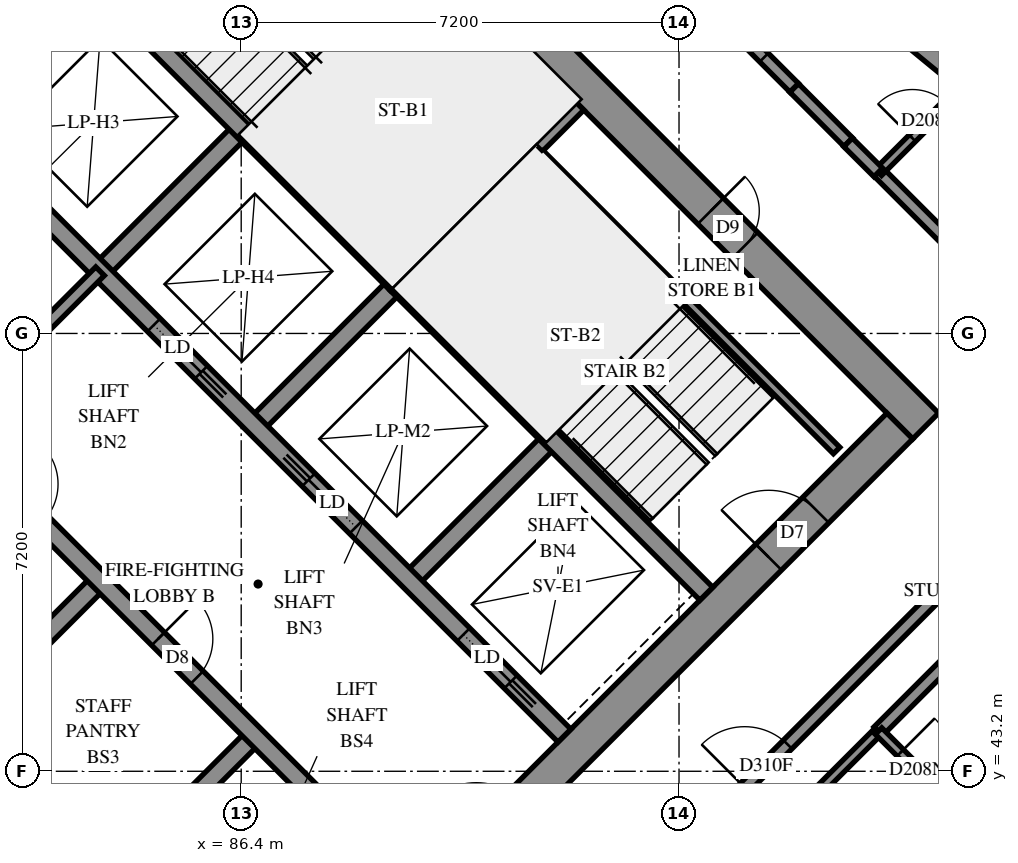
"""IFC4 building model, lengths in metres.
Left out: names, types, materials, properties, quantities, classifications, styles, units other than length and angle.
Written with IfcOpenShell. Run it as: python <this file> out.ifc"""

import sys

from ifc_helpers import new_model, si_unit, direction, frame, frame_2d, origin, place, context, subcontext, project, spatial, polyline, rectangle, outline, extrude, element, fill, save


model = new_model("IFC4")
c1 = context("Model", 3, precision=1e-05, world=origin(), true_north=direction((0.0, 1.0)))
c2 = subcontext(c1, "Body", "Model", "MODEL_VIEW")
j1 = project(units=[si_unit("LENGTHUNIT", "METRE"), si_unit("PLANEANGLEUNIT", "RADIAN")], contexts=[c1])
p1 = place(None, origin())
s1 = spatial("IfcSite", under=j1, at=p1, CompositionType="ELEMENT")
p2 = place(p1, origin())
s2 = spatial("IfcBuilding", under=s1, at=p2, CompositionType="ELEMENT")
p3 = place(p2, frame((0.0, 0.0, 138.8)))
s3 = spatial("IfcBuildingStorey", under=s2, at=p3, CompositionType="ELEMENT", Elevation=138.8)
p4 = place(p3, frame((76.018, 49.302, -0.3), z_axis=(0.0, 0.0, 1.0), x_axis=(0.7071067812, -0.7071067812, 0.0)))
e1 = element("IfcWall", 1, at=p4, inside=s3, PredefinedType="SHEAR", context=c2, shape_type="SweptSolid", body=[
    extrude(rectangle(XDim=15.6, YDim=0.6, at=frame_2d((7.8, 0.0))), origin(), (0.0, 0.0, 1.0), 2.7),
])
p5 = place(p3, frame((86.625, 59.908, -0.3), z_axis=(0.0, 0.0, 1.0), x_axis=(0.7071067812, -0.7071067812, 0.0)))
e2 = element("IfcWall", 2, at=p5, inside=s3, PredefinedType="SHEAR", context=c2, shape_type="SweptSolid", body=[
    extrude(rectangle(XDim=15.6, YDim=0.6, at=frame_2d((7.8, 0.0))), origin(), (0.0, 0.0, 1.0), 2.7),
])
p6 = place(p5, frame((10.6, 0.0, 0.3)))
e3 = element("IfcOpeningElement", 3, at=p6, cuts=e2, PredefinedType="OPENING", context=c2, shape_type="SweptSolid", body=[
    extrude(rectangle(XDim=0.8, YDim=2.1, at=frame_2d((0.4, 1.05))), frame((0.0, 0.31, 0.0), z_axis=(0.0, -1.0, 0.0), x_axis=(1.0, 0.0, 0.0)), (0.0, 0.0, 1.0), 0.62),
])
p7 = place(p3, frame((76.442, 49.302, -0.3), z_axis=(0.0, 0.0, 1.0), x_axis=(0.7071067812, 0.7071067812, 0.0)))
e4 = element("IfcWall", 4, at=p7, inside=s3, PredefinedType="SHEAR", context=c2, shape_type="SweptSolid", body=[
    extrude(rectangle(XDim=14.4, YDim=0.6, at=frame_2d((7.2, 0.0))), origin(), (0.0, 0.0, 1.0), 2.7),
])
p8 = place(p7, frame((4.55, 0.0, 0.3)))
e5 = element("IfcOpeningElement", 5, at=p8, cuts=e4, PredefinedType="OPENING", context=c2, shape_type="SweptSolid", body=[
    extrude(rectangle(XDim=1.1, YDim=2.1, at=frame_2d((0.55, 1.05))), frame((0.0, 0.31, 0.0), z_axis=(0.0, -1.0, 0.0), x_axis=(1.0, 0.0, 0.0)), (0.0, 0.0, 1.0), 0.62),
])
p9 = place(p7, frame((11.35, 0.0, 0.3)))
e6 = element("IfcOpeningElement", 6, at=p9, cuts=e4, PredefinedType="OPENING", context=c2, shape_type="SweptSolid", body=[
    extrude(rectangle(XDim=1.1, YDim=2.1, at=frame_2d((0.55, 1.05))), frame((0.0, 0.31, 0.0), z_axis=(0.0, -1.0, 0.0), x_axis=(1.0, 0.0, 0.0)), (0.0, 0.0, 1.0), 0.62),
])
p10 = place(p3, frame((87.049, 38.695, -0.3), z_axis=(0.0, 0.0, 1.0), x_axis=(0.7071067812, 0.7071067812, 0.0)))
e7 = element("IfcWall", 7, at=p10, inside=s3, PredefinedType="SHEAR", context=c2, shape_type="SweptSolid", body=[
    extrude(rectangle(XDim=14.4, YDim=0.6, at=frame_2d((7.2, 0.0))), origin(), (0.0, 0.0, 1.0), 2.7),
])
p11 = place(p10, frame((4.55, 0.0, 0.3)))
e8 = element("IfcOpeningElement", 8, at=p11, cuts=e7, PredefinedType="OPENING", context=c2, shape_type="SweptSolid", body=[
    extrude(rectangle(XDim=1.1, YDim=2.1, at=frame_2d((0.55, 1.05))), frame((0.0, 0.31, 0.0), z_axis=(0.0, -1.0, 0.0), x_axis=(1.0, 0.0, 0.0)), (0.0, 0.0, 1.0), 0.62),
])
p12 = place(p10, frame((11.35, 0.0, 0.3)))
e9 = element("IfcOpeningElement", 9, at=p12, cuts=e7, PredefinedType="OPENING", context=c2, shape_type="SweptSolid", body=[
    extrude(rectangle(XDim=1.1, YDim=2.1, at=frame_2d((0.55, 1.05))), frame((0.0, 0.31, 0.0), z_axis=(0.0, -1.0, 0.0), x_axis=(1.0, 0.0, 0.0)), (0.0, 0.0, 1.0), 0.62),
])
p13 = place(p3, frame((84.079, 51.423, 0.0), z_axis=(0.0, 0.0, 1.0), x_axis=(0.7071219326, 0.7070916295, 0.0)))
e10 = element("IfcWall", 10, at=p13, inside=s3, PredefinedType="SOLIDWALL", context=c2, shape_type="SweptSolid", body=[
    extrude(rectangle(XDim=3.3, YDim=0.3, at=frame_2d((1.65, 0.0))), origin(), (0.0, 0.0, 1.0), 3.1),
])
p14 = place(p3, frame((81.746, 43.999, 0.0), z_axis=(0.0, 0.0, 1.0), x_axis=(0.7071067812, 0.7071067812, 0.0)))
e11 = element("IfcWall", 11, at=p14, inside=s3, PredefinedType="SOLIDWALL", context=c2, shape_type="SweptSolid", body=[
    extrude(rectangle(XDim=3.3, YDim=0.3, at=frame_2d((1.65, 0.0))), origin(), (0.0, 0.0, 1.0), 3.1),
])
p15 = place(p3, frame((86.625, 48.878, 0.0), z_axis=(0.0, 0.0, 1.0), x_axis=(0.7071067812, 0.7071067812, 0.0)))
e12 = element("IfcWall", 12, at=p15, inside=s3, PredefinedType="SOLIDWALL", context=c2, shape_type="SweptSolid", body=[
    extrude(rectangle(XDim=3.3, YDim=0.3, at=frame_2d((1.65, 0.0))), origin(), (0.0, 0.0, 1.0), 3.1),
])
p16 = place(p3, frame((84.291, 41.453, 0.0), z_axis=(0.0, 0.0, 1.0), x_axis=(0.7071067812, 0.7071067812, 0.0)))
e13 = element("IfcWall", 13, at=p16, inside=s3, PredefinedType="SOLIDWALL", context=c2, shape_type="SweptSolid", body=[
    extrude(rectangle(XDim=3.3, YDim=0.3, at=frame_2d((1.65, 0.0))), origin(), (0.0, 0.0, 1.0), 3.1),
])
p17 = place(p3, frame((89.17, 46.332, 0.0), z_axis=(0.0, 0.0, 1.0), x_axis=(0.7071067812, 0.7071067812, 0.0)))
e14 = element("IfcWall", 14, at=p17, inside=s3, PredefinedType="SOLIDWALL", context=c2, shape_type="SweptSolid", body=[
    extrude(rectangle(XDim=3.3, YDim=0.3, at=frame_2d((1.65, 0.0))), origin(), (0.0, 0.0, 1.0), 3.1),
])
p18 = place(p3, frame((78.988, 51.423, 0.0), z_axis=(0.0, 0.0, 1.0), x_axis=(0.7071067812, -0.7071067812, 0.0)))
e15 = element("IfcWall", 15, at=p18, inside=s3, PredefinedType="SOLIDWALL", context=c2, shape_type="SweptSolid", body=[
    extrude(rectangle(XDim=14.4, YDim=0.3, at=frame_2d((7.2, 0.0))), origin(), (0.0, 0.0, 1.0), 3.1),
])
p19 = place(p18, frame((1.35, 0.0, 0.0)))
e16 = element("IfcOpeningElement", 16, at=p19, cuts=e15, PredefinedType="OPENING", context=c2, shape_type="SweptSolid", body=[
    extrude(rectangle(XDim=0.9, YDim=2.1, at=frame_2d((0.45, 1.05))), frame((0.0, 0.16, 0.0), z_axis=(0.0, -1.0, 0.0), x_axis=(1.0, 0.0, 0.0)), (0.0, 0.0, 1.0), 0.32),
])
p20 = place(p18, frame((4.95, 0.0, 0.0)))
e17 = element("IfcOpeningElement", 17, at=p20, cuts=e15, PredefinedType="OPENING", context=c2, shape_type="SweptSolid", body=[
    extrude(rectangle(XDim=0.9, YDim=2.1, at=frame_2d((0.45, 1.05))), frame((0.0, 0.16, 0.0), z_axis=(0.0, -1.0, 0.0), x_axis=(1.0, 0.0, 0.0)), (0.0, 0.0, 1.0), 0.32),
])
p21 = place(p18, frame((8.55, 0.0, 0.0)))
e18 = element("IfcOpeningElement", 18, at=p21, cuts=e15, PredefinedType="OPENING", context=c2, shape_type="SweptSolid", body=[
    extrude(rectangle(XDim=0.9, YDim=2.1, at=frame_2d((0.45, 1.05))), frame((0.0, 0.16, 0.0), z_axis=(0.0, -1.0, 0.0), x_axis=(1.0, 0.0, 0.0)), (0.0, 0.0, 1.0), 0.32),
])
p22 = place(p18, frame((12.05, 0.0, 0.0)))
e19 = element("IfcOpeningElement", 19, at=p22, cuts=e15, PredefinedType="OPENING", context=c2, shape_type="SweptSolid", body=[
    extrude(rectangle(XDim=1.1, YDim=2.1, at=frame_2d((0.55, 1.05))), frame((0.0, 0.16, 0.0), z_axis=(0.0, -1.0, 0.0), x_axis=(1.0, 0.0, 0.0)), (0.0, 0.0, 1.0), 0.32),
])
p23 = place(p3, frame((81.534, 53.969, 0.0), z_axis=(0.0, 0.0, 1.0), x_axis=(0.707103309, -0.7071102534, 0.0)))
e20 = element("IfcWall", 20, at=p23, inside=s3, PredefinedType="SOLIDWALL", context=c2, shape_type="SweptSolid", body=[
    extrude(rectangle(XDim=14.4, YDim=0.3, at=frame_2d((7.2, 0.0))), origin(), (0.0, 0.0, 1.0), 3.1),
])
p24 = place(p23, frame((1.25, 0.0, 0.0)))
e21 = element("IfcOpeningElement", 21, at=p24, cuts=e20, PredefinedType="OPENING", context=c2, shape_type="SweptSolid", body=[
    extrude(rectangle(XDim=1.1, YDim=2.1, at=frame_2d((0.55, 1.05))), frame((0.0, 0.16, 0.0), z_axis=(0.0, -1.0, 0.0), x_axis=(1.0, 0.0, 0.0)), (0.0, 0.0, 1.0), 0.32),
])
p25 = place(p23, frame((4.85, 0.0, 0.0)))
e22 = element("IfcOpeningElement", 22, at=p25, cuts=e20, PredefinedType="OPENING", context=c2, shape_type="SweptSolid", body=[
    extrude(rectangle(XDim=1.1, YDim=2.1, at=frame_2d((0.55, 1.05))), frame((0.0, 0.16, 0.0), z_axis=(0.0, -1.0, 0.0), x_axis=(1.0, 0.0, 0.0)), (0.0, 0.0, 1.0), 0.32),
])
p26 = place(p23, frame((8.45, 0.0, 0.0)))
e23 = element("IfcOpeningElement", 23, at=p26, cuts=e20, PredefinedType="OPENING", context=c2, shape_type="SweptSolid", body=[
    extrude(rectangle(XDim=1.1, YDim=2.1, at=frame_2d((0.55, 1.05))), frame((0.0, 0.16, 0.0), z_axis=(0.0, -1.0, 0.0), x_axis=(1.0, 0.0, 0.0)), (0.0, 0.0, 1.0), 0.32),
])
p27 = place(p23, frame((12.05, 0.0, 0.0)))
e24 = element("IfcOpeningElement", 24, at=p27, cuts=e20, PredefinedType="OPENING", context=c2, shape_type="SweptSolid", body=[
    extrude(rectangle(XDim=1.1, YDim=2.1, at=frame_2d((0.55, 1.05))), frame((0.0, 0.16, 0.0), z_axis=(0.0, -1.0, 0.0), x_axis=(1.0, 0.0, 0.0)), (0.0, 0.0, 1.0), 0.32),
])
for number, where, z_axis, x_axis in (
    (25, (83.867, 56.302, 0.0), (0.0, 0.0, 1.0), (0.707, -0.707, 0.0)),
    (26, (88.958, 51.211, 0.0), (0.0, 0.0, 1.0), (0.707, -0.707, 0.0)),
):
    element("IfcWall", number, at=place(p3, frame(where, z_axis=z_axis, x_axis=x_axis)), inside=s3, PredefinedType="SOLIDWALL", context=c2, shape_type="SweptSolid", body=[
        extrude(rectangle(XDim=7.2, YDim=0.3, at=frame_2d((3.6, 0.0))), origin(), (0.0, 0.0, 1.0), 3.1),
    ])
p28 = place(p3, frame((88.958, 51.211, 0.0), z_axis=(0.0, 0.0, 1.0), x_axis=(0.7071067812, 0.7071067812, 0.0)))
e27 = element("IfcWall", 27, at=p28, inside=s3, PredefinedType="SOLIDWALL", context=c2, shape_type="SweptSolid", body=[
    extrude(rectangle(XDim=4.2, YDim=0.3, at=frame_2d((2.1, 0.0))), origin(), (0.0, 0.0, 1.0), 3.1),
])
p29 = place(p3, frame((98.564, 54.445, 0.0), z_axis=(0.0, 0.0, 1.0), x_axis=(-0.7725898055, 0.6349054988, 0.0)))
e28 = element("IfcWall", 28, at=p29, inside=s3, PredefinedType="SOLIDWALL", context=c2, shape_type="SweptSolid", body=[
    extrude(outline(polyline([(-0.025, -0.25), (3.365, -0.25), (3.414, 0.25), (0.025, 0.25), (-0.025, -0.25)])), origin(), (0.0, 0.0, 1.0), 3.1),
])
p30 = place(p29, frame((1.45, 0.0, 0.45)))
e29 = element("IfcOpeningElement", 29, at=p30, cuts=e28, PredefinedType="OPENING", context=c2, shape_type="SweptSolid", body=[
    extrude(rectangle(XDim=1.2, YDim=2.5, at=frame_2d((0.6, 1.25))), frame((0.0, 0.26, 0.0), z_axis=(0.0, -1.0, 0.0), x_axis=(1.0, 0.0, 0.0)), (0.0, 0.0, 1.0), 0.52),
])
p31 = place(p3, frame((91.313, 53.354, 0.0), z_axis=(0.0, 0.0, 1.0), x_axis=(0.7071140275, -0.7070995348, 0.0)))
e30 = element("IfcWall", 30, at=p31, inside=s3, PredefinedType="PARTITIONING", context=c2, shape_type="SweptSolid", body=[
    extrude(rectangle(XDim=6.9, YDim=0.15, at=frame_2d((3.45, 0.0))), origin(), (0.0, 0.0, 1.0), 3.1),
])
p32 = place(p3, frame((81.534, 48.878, 0.0), z_axis=(0.0, 0.0, 1.0), x_axis=(0.707092892, 0.7071206701, 0.0)))
e31 = element("IfcWall", 31, at=p32, inside=s3, PredefinedType="PARTITIONING", context=c2, shape_type="SweptSolid", body=[
    extrude(rectangle(XDim=3.6, YDim=0.2, at=frame_2d((1.8, 0.0))), origin(), (0.0, 0.0, 1.0), 3.1),
])
p33 = place(p3, frame((88.326, 61.609, 0.0), z_axis=(0.0, 0.0, 1.0), x_axis=(0.7071067812, -0.7071067812, 0.0)))
e32 = element("IfcWall", 32, at=p33, inside=s3, PredefinedType="PARTITIONING", context=c2, shape_type="SweptSolid", body=[
    extrude(rectangle(XDim=10.14, YDim=0.2, at=frame_2d((5.07, 0.0))), origin(), (0.0, 0.0, 1.0), 3.1),
])
p34 = place(p33, frame((8.535, 0.0, 0.0)))
e33 = element("IfcOpeningElement", 33, at=p34, cuts=e32, PredefinedType="OPENING", context=c2, shape_type="SweptSolid", body=[
    extrude(rectangle(XDim=0.9, YDim=2.1, at=frame_2d((0.45, 1.05))), frame((0.0, 0.11, 0.0), z_axis=(0.0, -1.0, 0.0), x_axis=(1.0, 0.0, 0.0)), (0.0, 0.0, 1.0), 0.22),
])
p35 = place(p3, frame((94.543, 42.797, 0.0), z_axis=(0.0, 0.0, 1.0), x_axis=(0.7071067812, 0.7071067812, 0.0)))
e34 = element("IfcWall", 34, at=p35, inside=s3, PredefinedType="PARTITIONING", context=c2, shape_type="SweptSolid", body=[
    extrude(rectangle(XDim=8.901, YDim=0.2, at=frame_2d((4.45, 0.0))), origin(), (0.0, 0.0, 1.0), 3.1),
])
p36 = place(p35, frame((0.193, 0.0, 0.0)))
e35 = element("IfcOpeningElement", 35, at=p36, cuts=e34, PredefinedType="OPENING", context=c2, shape_type="SweptSolid", body=[
    extrude(rectangle(XDim=1.0, YDim=2.1, at=frame_2d((0.5, 1.05))), frame((0.0, 0.11, 0.0), z_axis=(0.0, -1.0, 0.0), x_axis=(1.0, 0.0, 0.0)), (0.0, 0.0, 1.0), 0.22),
])
p37 = place(p3, frame((96.877, 43.859, 0.0), z_axis=(0.0, 0.0, 1.0), x_axis=(0.707112746, 0.7071008163, 0.0)))
e36 = element("IfcWall", 36, at=p37, inside=s3, PredefinedType="PARTITIONING", context=c2, shape_type="SweptSolid", body=[
    extrude(rectangle(XDim=8.382, YDim=0.2, at=frame_2d((4.191, 0.0))), origin(), (0.0, 0.0, 1.0), 3.1),
])
p38 = place(p3, frame((95.179, 42.161, 0.0), z_axis=(0.0, 0.0, 1.0), x_axis=(0.7071067812, 0.7071067812, 0.0)))
e37 = element("IfcWall", 37, at=p38, inside=s3, PredefinedType="PARTITIONING", context=c2, shape_type="SweptSolid", body=[
    extrude(rectangle(XDim=2.401, YDim=0.15, at=frame_2d((1.201, 0.0))), origin(), (0.0, 0.0, 1.0), 3.1),
])
p39 = place(p3, frame((96.882, 53.053, 0.0), z_axis=(0.0, 0.0, 1.0), x_axis=(0.7071067812, -0.7071067812, 0.0)))
e38 = element("IfcWall", 38, at=p39, inside=s3, PredefinedType="PARTITIONING", context=c2, shape_type="SweptSolid", body=[
    extrude(rectangle(XDim=1.901, YDim=0.2, at=frame_2d((0.95, 0.0))), origin(), (0.0, 0.0, 1.0), 3.1),
])
p40 = place(p3, frame((96.881, 43.861, 0.0), z_axis=(0.0, 0.0, 1.0), x_axis=(0.7071067812, -0.7071067812, 0.0)))
e39 = element("IfcWall", 39, at=p40, inside=s3, PredefinedType="PARTITIONING", context=c2, shape_type="SweptSolid", body=[
    extrude(rectangle(XDim=1.901, YDim=0.15, at=frame_2d((0.95, 0.0))), origin(), (0.0, 0.0, 1.0), 3.1),
])
p41 = place(p40, frame((0.505, 0.0, 0.0)))
e40 = element("IfcOpeningElement", 40, at=p41, cuts=e39, PredefinedType="OPENING", context=c2, shape_type="SweptSolid", body=[
    extrude(rectangle(XDim=0.8, YDim=2.1, at=frame_2d((0.4, 1.05))), frame((0.0, 0.085, 0.0), z_axis=(0.0, -1.0, 0.0), x_axis=(1.0, 0.0, 0.0)), (0.0, 0.0, 1.0), 0.17),
])
p42 = place(p3, frame((96.877, 53.051, 0.0), z_axis=(0.0, 0.0, 1.0), x_axis=(0.7071330019, 0.7070805595, 0.0)))
e41 = element("IfcWall", 41, at=p42, inside=s3, PredefinedType="PARTITIONING", context=c2, shape_type="SweptSolid", body=[
    extrude(rectangle(XDim=1.907, YDim=0.15, at=frame_2d((0.954, 0.0))), origin(), (0.0, 0.0, 1.0), 3.1),
])
p43 = place(p42, frame((0.793, 0.0, 0.0)))
e42 = element("IfcOpeningElement", 42, at=p43, cuts=e41, PredefinedType="OPENING", context=c2, shape_type="SweptSolid", body=[
    extrude(rectangle(XDim=0.8, YDim=2.1, at=frame_2d((0.4, 1.05))), frame((0.0, 0.085, 0.0), z_axis=(0.0, -1.0, 0.0), x_axis=(1.0, 0.0, 0.0)), (0.0, 0.0, 1.0), 0.17),
])
p44 = place(p3, frame((95.494, 54.438, 0.0), z_axis=(0.0, 0.0, 1.0), x_axis=(0.706312726, -0.7078999456, 0.0)))
e43 = element("IfcWall", 43, at=p44, inside=s3, PredefinedType="PARTITIONING", context=c2, shape_type="SweptSolid", body=[
    extrude(rectangle(XDim=1.26, YDim=0.2, at=frame_2d((0.63, 0.0))), origin(), (0.0, 0.0, 1.0), 3.1),
])
p45 = place(p3, frame((96.38, 53.542, 0.0), z_axis=(0.0, 0.0, 1.0), x_axis=(0.7085338339, -0.7056768426, 0.0)))
e44 = element("IfcWall", 44, at=p45, inside=s3, PredefinedType="PARTITIONING", context=c2, shape_type="SweptSolid", body=[
    extrude(rectangle(XDim=0.7, YDim=0.2, at=frame_2d((0.35, 0.0))), origin(), (0.0, 0.0, 1.0), 3.1),
])
p46 = place(p6, origin())
e45 = element("IfcDoor", 45, at=p46, inside=s3, OperationType="SINGLE_SWING_RIGHT", PredefinedType="DOOR", context=c2, shape_type="SweptSolid", body=[
    extrude(rectangle(XDim=0.8, YDim=2.1, at=frame_2d((0.4, 1.05))), frame((0.0, 0.025, 0.0), z_axis=(0.0, -1.0, 0.0), x_axis=(1.0, 0.0, 0.0)), (0.0, 0.0, 1.0), 0.05),
])
fill(e3, e45)
p47 = place(p12, origin())
e46 = element("IfcDoor", 46, at=p47, inside=s3, OperationType="SINGLE_SWING_RIGHT", PredefinedType="DOOR", context=c2, shape_type="SweptSolid", body=[
    extrude(rectangle(XDim=1.1, YDim=2.1, at=frame_2d((0.55, 1.05))), frame((0.0, 0.025, 0.0), z_axis=(0.0, -1.0, 0.0), x_axis=(1.0, 0.0, 0.0)), (0.0, 0.0, 1.0), 0.05),
])
fill(e9, e46)
p48 = place(p21, origin())
e47 = element("IfcDoor", 47, at=p48, inside=s3, OperationType="SINGLE_SWING_LEFT", PredefinedType="DOOR", context=c2, shape_type="SweptSolid", body=[
    extrude(rectangle(XDim=0.9, YDim=2.1, at=frame_2d((0.45, 1.05))), frame((0.0, 0.025, 0.0), z_axis=(0.0, -1.0, 0.0), x_axis=(1.0, 0.0, 0.0)), (0.0, 0.0, 1.0), 0.05),
])
fill(e18, e47)
p49 = place(p25, origin())
e48 = element("IfcDoor", 48, at=p49, inside=s3, OperationType="SLIDING_TO_RIGHT", PredefinedType="DOOR", context=c2, shape_type="SweptSolid", body=[
    extrude(rectangle(XDim=1.1, YDim=2.1, at=frame_2d((0.55, 1.05))), frame((0.0, 0.025, 0.0), z_axis=(0.0, -1.0, 0.0), x_axis=(1.0, 0.0, 0.0)), (0.0, 0.0, 1.0), 0.05),
])
fill(e22, e48)
p50 = place(p26, origin())
e49 = element("IfcDoor", 49, at=p50, inside=s3, OperationType="SLIDING_TO_LEFT", PredefinedType="DOOR", context=c2, shape_type="SweptSolid", body=[
    extrude(rectangle(XDim=1.1, YDim=2.1, at=frame_2d((0.55, 1.05))), frame((0.0, 0.025, 0.0), z_axis=(0.0, -1.0, 0.0), x_axis=(1.0, 0.0, 0.0)), (0.0, 0.0, 1.0), 0.05),
])
fill(e23, e49)
p51 = place(p27, origin())
e50 = element("IfcDoor", 50, at=p51, inside=s3, OperationType="SLIDING_TO_RIGHT", PredefinedType="DOOR", context=c2, shape_type="SweptSolid", body=[
    extrude(rectangle(XDim=1.1, YDim=2.1, at=frame_2d((0.55, 1.05))), frame((0.0, 0.025, 0.0), z_axis=(0.0, -1.0, 0.0), x_axis=(1.0, 0.0, 0.0)), (0.0, 0.0, 1.0), 0.05),
])
fill(e24, e50)
p52 = place(p34, origin())
e51 = element("IfcDoor", 51, at=p52, inside=s3, OperationType="SINGLE_SWING_LEFT", PredefinedType="DOOR", context=c2, shape_type="SweptSolid", body=[
    extrude(rectangle(XDim=0.9, YDim=2.1, at=frame_2d((0.45, 1.05))), frame((0.0, 0.025, 0.0), z_axis=(0.0, -1.0, 0.0), x_axis=(1.0, 0.0, 0.0)), (0.0, 0.0, 1.0), 0.05),
])
fill(e33, e51)
p53 = place(p43, origin())
e52 = element("IfcDoor", 52, at=p53, inside=s3, OperationType="SINGLE_SWING_RIGHT", PredefinedType="DOOR", context=c2, shape_type="SweptSolid", body=[
    extrude(rectangle(XDim=0.8, YDim=2.1, at=frame_2d((0.4, 1.05))), frame((0.0, 0.025, 0.0), z_axis=(0.0, -1.0, 0.0), x_axis=(1.0, 0.0, 0.0)), (0.0, 0.0, 1.0), 0.05),
])
fill(e42, e52)
p54 = place(p36, origin())
e53 = element("IfcDoor", 53, at=p54, inside=s3, OperationType="SINGLE_SWING_LEFT", PredefinedType="DOOR", context=c2, shape_type="SweptSolid", body=[
    extrude(rectangle(XDim=1.0, YDim=2.1, at=frame_2d((0.5, 1.05))), frame((0.0, 0.025, 0.0), z_axis=(0.0, -1.0, 0.0), x_axis=(1.0, 0.0, 0.0)), (0.0, 0.0, 1.0), 0.05),
])
fill(e35, e53)
p55 = place(p41, origin())
e54 = element("IfcDoor", 54, at=p55, inside=s3, OperationType="SINGLE_SWING_RIGHT", PredefinedType="DOOR", context=c2, shape_type="SweptSolid", body=[
    extrude(rectangle(XDim=0.8, YDim=2.1, at=frame_2d((0.4, 1.05))), frame((0.0, 0.025, 0.0), z_axis=(0.0, -1.0, 0.0), x_axis=(1.0, 0.0, 0.0)), (0.0, 0.0, 1.0), 0.05),
])
fill(e40, e54)
save(model, sys.argv[1])
